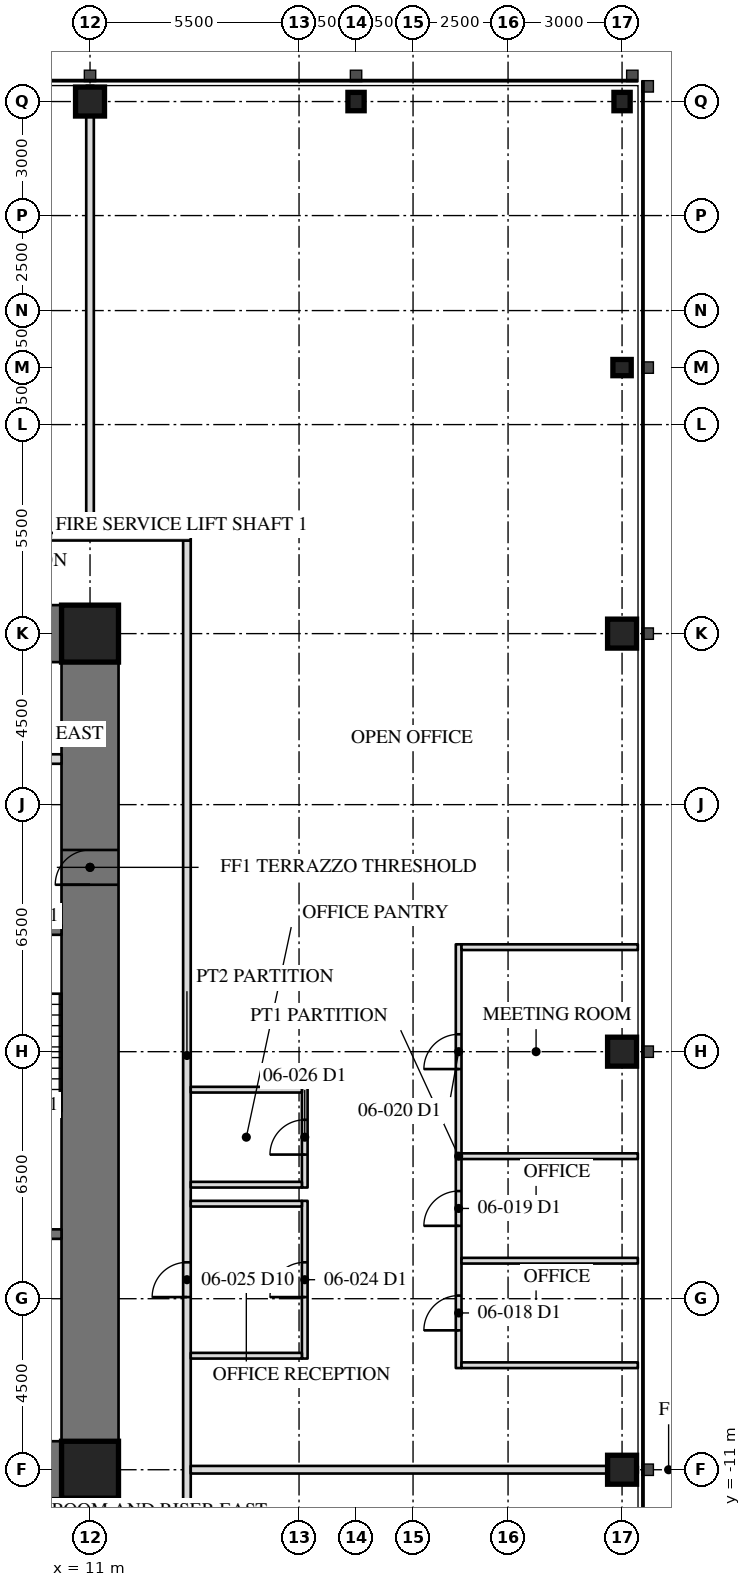
"""IFC4 building model, lengths in metres.
Left out: names, types, materials, properties, quantities, classifications, styles, units other than length and angle.
Written with IfcOpenShell. Run it as: python <this file> out.ifc"""

import sys

from ifc_helpers import new_model, si_unit, direction, frame, frame_2d, origin, origin_2d, place, context, subcontext, project, spatial, rectangle, hollow_rectangle, i_section, extrude, element, fill, save


model = new_model("IFC4")
c1 = context("Model", 3, precision=1e-05, world=origin(), true_north=direction((0.0, 1.0)))
c2 = subcontext(c1, "Body", "Model", "MODEL_VIEW")
j1 = project(units=[si_unit("LENGTHUNIT", "METRE"), si_unit("PLANEANGLEUNIT", "RADIAN")], contexts=[c1])
p1 = place(None, origin())
s1 = spatial("IfcSite", under=j1, at=p1, CompositionType="ELEMENT")
p2 = place(p1, origin())
s2 = spatial("IfcBuilding", under=s1, at=p2, CompositionType="ELEMENT")
p3 = place(p2, frame((0.0, 0.0, 28.3)))
s3 = spatial("IfcBuildingStorey", under=s2, at=p3, CompositionType="ELEMENT", Elevation=28.3)
for number, where, z_axis, x_axis in (
    (1, (25.0, -11.0, 0.0), (0.0, 0.0, 1.0), (0.0, 1.0, 0.0)),
    (2, (25.0, 0.0, 0.0), (0.0, 0.0, 1.0), (0.0, 1.0, 0.0)),
    (3, (25.0, 11.0, 0.0), (0.0, 0.0, 1.0), (0.0, 1.0, 0.0)),
):
    element("IfcColumn", number, at=place(p3, frame(where, z_axis=z_axis, x_axis=x_axis)), inside=s3, PredefinedType="COLUMN", context=c2, shape_type="SweptSolid", body=[
        extrude(hollow_rectangle(XDim=0.762, YDim=0.762, WallThickness=0.127, at=origin_2d()), origin(), (0.0, 0.0, 1.0), 4.1),
    ])
for number, where, z_axis, x_axis in (
    (4, (25.0, 18.0, 0.0), (0.0, 0.0, 1.0), (0.0, 1.0, 0.0)),
    (5, (25.0, 25.0, 0.0), (0.0, 0.0, 1.0), (1.0, 0.0, 0.0)),
    (6, (18.0, 25.0, 0.0), (0.0, 0.0, 1.0), (1.0, 0.0, 0.0)),
):
    element("IfcColumn", number, at=place(p3, frame(where, z_axis=z_axis, x_axis=x_axis)), inside=s3, PredefinedType="COLUMN", context=c2, shape_type="SweptSolid", body=[
        extrude(i_section(OverallWidth=0.427, OverallDepth=0.483, WebThickness=0.051, FlangeThickness=0.082, at=origin_2d()), origin(), (0.0, 0.0, 1.0), 4.1),
    ])
p4 = place(p3, frame((11.0, 25.0, 0.0), z_axis=(0.0, 0.0, 1.0), x_axis=(1.0, 0.0, 0.0)))
e7 = element("IfcColumn", 7, at=p4, inside=s3, PredefinedType="COLUMN", context=c2, shape_type="SweptSolid", body=[
    extrude(hollow_rectangle(XDim=0.762, YDim=0.762, WallThickness=0.127, at=origin_2d()), origin(), (0.0, 0.0, 1.0), 4.1),
])
p5 = place(p3, frame((11.0, -11.0, 0.0), z_axis=(0.0, 0.0, 1.0), x_axis=(0.0, 1.0, 0.0)))
e8 = element("IfcWall", 8, at=p5, inside=s3, PredefinedType="SHEAR", context=c2, shape_type="SweptSolid", body=[
    extrude(rectangle(XDim=22.0, YDim=1.5, at=frame_2d((11.0, 0.0))), origin(), (0.0, 0.0, 1.0), 4.1),
])
p6 = place(p5, frame((15.393, 0.0, 0.0)))
e9 = element("IfcOpeningElement", 9, at=p6, cuts=e8, PredefinedType="OPENING", context=c2, shape_type="SweptSolid", body=[
    extrude(rectangle(XDim=0.915, YDim=2.134, at=frame_2d((0.458, 1.067))), frame((0.0, 0.76, 0.0), z_axis=(0.0, -1.0, 0.0), x_axis=(1.0, 0.0, 0.0)), (0.0, 0.0, 1.0), 1.52),
])
for number, where, z_axis, x_axis in (
    (10, (11.0, 11.0, 0.0), (0.0, 0.0, 1.0), (-1.0, 0.0, 0.0)),
    (11, (6.5, -11.0, 0.0), (0.0, 0.0, 1.0), (1.0, 0.0, 0.0)),
):
    element("IfcWall", number, at=place(p3, frame(where, z_axis=z_axis, x_axis=x_axis)), inside=s3, PredefinedType="SHEAR", context=c2, shape_type="SweptSolid", body=[
        extrude(rectangle(XDim=4.5, YDim=1.5, at=frame_2d((2.25, 0.0))), origin(), (0.0, 0.0, 1.0), 4.1),
    ])
for number, where, z_axis, x_axis in (
    (12, (11.0, 11.0, 0.0), (0.0, 0.0, 1.0), (1.0, 0.0, 0.0)),
    (13, (11.0, -11.0, 0.0), (0.0, 0.0, 1.0), (1.0, 0.0, 0.0)),
):
    element("IfcColumn", number, at=place(p3, frame(where, z_axis=z_axis, x_axis=x_axis)), inside=s3, PredefinedType="COLUMN", context=c2, shape_type="SweptSolid", body=[
        extrude(hollow_rectangle(XDim=1.499, YDim=1.499, WallThickness=0.102, at=origin_2d()), origin(), (0.0, 0.0, 1.0), 4.1),
    ])
p7 = place(p3, frame((6.95, -4.8, 0.0), z_axis=(0.0, 0.0, 1.0), x_axis=(1.0, 0.0, 0.0)))
e14 = element("IfcWall", 14, at=p7, inside=s3, PredefinedType="SOLIDWALL", context=c2, shape_type="SweptSolid", body=[
    extrude(rectangle(XDim=3.3, YDim=0.25, at=frame_2d((1.65, 0.0))), origin(), (0.0, 0.0, 1.0), 3.91),
])
p8 = place(p3, frame((6.95, 3.2, 0.0), z_axis=(0.0, 0.0, 1.0), x_axis=(1.0, 0.0, 0.0)))
e15 = element("IfcWall", 15, at=p8, inside=s3, PredefinedType="SOLIDWALL", context=c2, shape_type="SweptSolid", body=[
    extrude(rectangle(XDim=3.3, YDim=0.25, at=frame_2d((1.65, 0.0))), origin(), (0.0, 0.0, 1.0), 3.91),
])
p9 = place(p8, frame((1.116, 0.0, 0.0)))
e16 = element("IfcOpeningElement", 16, at=p9, cuts=e15, PredefinedType="OPENING", context=c2, shape_type="SweptSolid", body=[
    extrude(rectangle(XDim=1.067, YDim=2.134, at=frame_2d((0.533, 1.067))), frame((0.0, 0.135, 0.0), z_axis=(0.0, -1.0, 0.0), x_axis=(1.0, 0.0, 0.0)), (0.0, 0.0, 1.0), 0.27),
])
p10 = place(p3, frame((6.95, 7.7, 0.0), z_axis=(0.0, 0.0, 1.0), x_axis=(1.0, 0.0, 0.0)))
e17 = element("IfcWall", 17, at=p10, inside=s3, PredefinedType="PARTITIONING", context=c2, shape_type="SweptSolid", body=[
    extrude(rectangle(XDim=3.3, YDim=0.25, at=frame_2d((1.65, 0.0))), origin(), (0.0, 0.0, 1.0), 3.91),
])
p11 = place(p10, frame((0.45, 0.0, 0.0)))
e18 = element("IfcOpeningElement", 18, at=p11, cuts=e17, PredefinedType="OPENING", context=c2, shape_type="SweptSolid", body=[
    extrude(rectangle(XDim=1.219, YDim=2.134, at=frame_2d((0.609, 1.067))), frame((0.0, 0.135, 0.0), z_axis=(0.0, -1.0, 0.0), x_axis=(1.0, 0.0, 0.0)), (0.0, 0.0, 1.0), 0.27),
])
p12 = place(p3, frame((13.55, -13.65, 0.0), z_axis=(0.0, 0.0, 1.0), x_axis=(0.0, 1.0, 0.0)))
e19 = element("IfcWall", 19, at=p12, inside=s3, PredefinedType="PARTITIONING", context=c2, shape_type="SweptSolid", body=[
    extrude(rectangle(XDim=27.1, YDim=0.2, at=frame_2d((13.55, 0.0))), origin(), (0.0, 0.0, 1.0), 3.91),
])
p13 = place(p12, frame((7.192, 0.0, 0.0)))
e20 = element("IfcOpeningElement", 20, at=p13, cuts=e19, PredefinedType="OPENING", context=c2, shape_type="SweptSolid", body=[
    extrude(rectangle(XDim=0.915, YDim=2.134, at=frame_2d((0.458, 1.067))), frame((0.0, 0.11, 0.0), z_axis=(0.0, -1.0, 0.0), x_axis=(1.0, 0.0, 0.0)), (0.0, 0.0, 1.0), 0.22),
])
p14 = place(p3, frame((13.65, 13.55, 0.0), z_axis=(0.0, 0.0, 1.0), x_axis=(-1.0, 0.0, 0.0)))
e21 = element("IfcWall", 21, at=p14, inside=s3, PredefinedType="PARTITIONING", context=c2, shape_type="SweptSolid", body=[
    extrude(rectangle(XDim=27.1, YDim=0.2, at=frame_2d((13.55, 0.0))), origin(), (0.0, 0.0, 1.0), 3.91),
])
p15 = place(p14, frame((9.192, 0.0, 0.0)))
e22 = element("IfcOpeningElement", 22, at=p15, cuts=e21, PredefinedType="OPENING", context=c2, shape_type="SweptSolid", body=[
    extrude(rectangle(XDim=0.915, YDim=2.134, at=frame_2d((0.458, 1.067))), frame((0.0, 0.11, 0.0), z_axis=(0.0, -1.0, 0.0), x_axis=(1.0, 0.0, 0.0)), (0.0, 0.0, 1.0), 0.22),
])
for number, where, z_axis, x_axis in (
    (23, (11.0, 13.65, 0.0), (0.0, 0.0, 1.0), (0.0, 1.0, 0.0)),
    (24, (13.65, -11.0, 0.0), (0.0, 0.0, 1.0), (1.0, 0.0, 0.0)),
):
    element("IfcWall", number, at=place(p3, frame(where, z_axis=z_axis, x_axis=x_axis)), inside=s3, PredefinedType="PARTITIONING", context=c2, shape_type="SweptSolid", body=[
        extrude(rectangle(XDim=11.765, YDim=0.2, at=frame_2d((5.883, 0.0))), origin(), (0.0, 0.0, 1.0), 3.13),
    ])
p16 = place(p3, frame((20.7, -8.325, 0.0), z_axis=(0.0, 0.0, 1.0), x_axis=(0.0, 1.0, 0.0)))
e25 = element("IfcWall", 25, at=p16, inside=s3, PredefinedType="PARTITIONING", context=c2, shape_type="SweptSolid", body=[
    extrude(rectangle(XDim=11.15, YDim=0.15, at=frame_2d((5.575, 0.0))), origin(), (0.0, 0.0, 1.0), 3.91),
])
p17 = place(p16, frame((0.992, 0.0, 0.0)))
e26 = element("IfcOpeningElement", 26, at=p17, cuts=e25, PredefinedType="OPENING", context=c2, shape_type="SweptSolid", body=[
    extrude(rectangle(XDim=0.915, YDim=2.134, at=frame_2d((0.458, 1.067))), frame((0.0, 0.085, 0.0), z_axis=(0.0, -1.0, 0.0), x_axis=(1.0, 0.0, 0.0)), (0.0, 0.0, 1.0), 0.17),
])
p18 = place(p16, frame((3.742, 0.0, 0.0)))
e27 = element("IfcOpeningElement", 27, at=p18, cuts=e25, PredefinedType="OPENING", context=c2, shape_type="SweptSolid", body=[
    extrude(rectangle(XDim=0.915, YDim=2.134, at=frame_2d((0.458, 1.067))), frame((0.0, 0.085, 0.0), z_axis=(0.0, -1.0, 0.0), x_axis=(1.0, 0.0, 0.0)), (0.0, 0.0, 1.0), 0.17),
])
p19 = place(p16, frame((7.867, 0.0, 0.0)))
e28 = element("IfcOpeningElement", 28, at=p19, cuts=e25, PredefinedType="OPENING", context=c2, shape_type="SweptSolid", body=[
    extrude(rectangle(XDim=0.915, YDim=2.134, at=frame_2d((0.458, 1.067))), frame((0.0, 0.085, 0.0), z_axis=(0.0, -1.0, 0.0), x_axis=(1.0, 0.0, 0.0)), (0.0, 0.0, 1.0), 0.17),
])
for number, where, z_axis, x_axis in (
    (29, (20.775, -8.25, 0.0), (0.0, 0.0, 1.0), (1.0, 0.0, 0.0)),
    (30, (20.775, -5.5, 0.0), (0.0, 0.0, 1.0), (1.0, 0.0, 0.0)),
    (31, (20.775, -2.75, 0.0), (0.0, 0.0, 1.0), (1.0, 0.0, 0.0)),
    (32, (20.775, 2.75, 0.0), (0.0, 0.0, 1.0), (1.0, 0.0, 0.0)),
):
    element("IfcWall", number, at=place(p3, frame(where, z_axis=z_axis, x_axis=x_axis)), inside=s3, PredefinedType="PARTITIONING", context=c2, shape_type="SweptSolid", body=[
        extrude(rectangle(XDim=4.64, YDim=0.15, at=frame_2d((2.32, 0.0))), origin(), (0.0, 0.0, 1.0), 3.91),
    ])
p20 = place(p3, frame((16.65, -8.075, 0.0), z_axis=(0.0, 0.0, 1.0), x_axis=(0.0, 1.0, 0.0)))
e33 = element("IfcWall", 33, at=p20, inside=s3, PredefinedType="PARTITIONING", context=c2, shape_type="SweptSolid", body=[
    extrude(rectangle(XDim=4.15, YDim=0.15, at=frame_2d((2.075, 0.0))), origin(), (0.0, 0.0, 1.0), 3.91),
])
p21 = place(p20, frame((1.617, 0.0, 0.0)))
e34 = element("IfcOpeningElement", 34, at=p21, cuts=e33, PredefinedType="OPENING", context=c2, shape_type="SweptSolid", body=[
    extrude(rectangle(XDim=0.915, YDim=2.134, at=frame_2d((0.458, 1.067))), frame((0.0, 0.085, 0.0), z_axis=(0.0, -1.0, 0.0), x_axis=(1.0, 0.0, 0.0)), (0.0, 0.0, 1.0), 0.17),
])
for number, where, z_axis, x_axis in (
    (35, (16.575, -8.0, 0.0), (0.0, 0.0, 1.0), (-1.0, 0.0, 0.0)),
    (36, (16.575, -4.0, 0.0), (0.0, 0.0, 1.0), (-1.0, 0.0, 0.0)),
):
    element("IfcWall", number, at=place(p3, frame(where, z_axis=z_axis, x_axis=x_axis)), inside=s3, PredefinedType="PARTITIONING", context=c2, shape_type="SweptSolid", body=[
        extrude(rectangle(XDim=2.925, YDim=0.15, at=frame_2d((1.462, 0.0))), origin(), (0.0, 0.0, 1.0), 3.91),
    ])
p22 = place(p3, frame((16.65, -3.575, 0.0), z_axis=(0.0, 0.0, 1.0), x_axis=(0.0, 1.0, 0.0)))
e37 = element("IfcWall", 37, at=p22, inside=s3, PredefinedType="PARTITIONING", context=c2, shape_type="SweptSolid", body=[
    extrude(rectangle(XDim=2.65, YDim=0.15, at=frame_2d((1.325, 0.0))), origin(), (0.0, 0.0, 1.0), 3.91),
])
p23 = place(p22, frame((0.867, 0.0, 0.0)))
e38 = element("IfcOpeningElement", 38, at=p23, cuts=e37, PredefinedType="OPENING", context=c2, shape_type="SweptSolid", body=[
    extrude(rectangle(XDim=0.915, YDim=2.134, at=frame_2d((0.458, 1.067))), frame((0.0, 0.085, 0.0), z_axis=(0.0, -1.0, 0.0), x_axis=(1.0, 0.0, 0.0)), (0.0, 0.0, 1.0), 0.17),
])
for number, where, z_axis, x_axis in (
    (39, (16.575, -3.5, 0.0), (0.0, 0.0, 1.0), (-1.0, 0.0, 0.0)),
    (40, (16.575, -1.0, 0.0), (0.0, 0.0, 1.0), (-1.0, 0.0, 0.0)),
):
    element("IfcWall", number, at=place(p3, frame(where, z_axis=z_axis, x_axis=x_axis)), inside=s3, PredefinedType="PARTITIONING", context=c2, shape_type="SweptSolid", body=[
        extrude(rectangle(XDim=2.925, YDim=0.15, at=frame_2d((1.462, 0.0))), origin(), (0.0, 0.0, 1.0), 3.91),
    ])
p24 = place(p6, origin())
e41 = element("IfcDoor", 41, at=p24, inside=s3, OperationType="SINGLE_SWING_RIGHT", PredefinedType="DOOR", context=c2, shape_type="SweptSolid", body=[
    extrude(rectangle(XDim=0.915, YDim=2.134, at=frame_2d((0.458, 1.067))), frame((0.0, -0.675, 0.0), z_axis=(0.0, -1.0, 0.0), x_axis=(1.0, 0.0, 0.0)), (0.0, 0.0, 1.0), 0.05),
])
fill(e9, e41)
p25 = place(p17, origin())
e42 = element("IfcDoor", 42, at=p25, inside=s3, OperationType="SINGLE_SWING_LEFT", PredefinedType="DOOR", context=c2, shape_type="SweptSolid", body=[
    extrude(rectangle(XDim=0.915, YDim=2.134, at=frame_2d((0.458, 1.067))), frame((0.0, 0.025, 0.0), z_axis=(0.0, -1.0, 0.0), x_axis=(1.0, 0.0, 0.0)), (0.0, 0.0, 1.0), 0.05),
])
fill(e26, e42)
p26 = place(p18, origin())
e43 = element("IfcDoor", 43, at=p26, inside=s3, OperationType="SINGLE_SWING_LEFT", PredefinedType="DOOR", context=c2, shape_type="SweptSolid", body=[
    extrude(rectangle(XDim=0.915, YDim=2.134, at=frame_2d((0.458, 1.067))), frame((0.0, 0.025, 0.0), z_axis=(0.0, -1.0, 0.0), x_axis=(1.0, 0.0, 0.0)), (0.0, 0.0, 1.0), 0.05),
])
fill(e27, e43)
p27 = place(p19, origin())
e44 = element("IfcDoor", 44, at=p27, inside=s3, OperationType="SINGLE_SWING_LEFT", PredefinedType="DOOR", context=c2, shape_type="SweptSolid", body=[
    extrude(rectangle(XDim=0.915, YDim=2.134, at=frame_2d((0.458, 1.067))), frame((0.0, 0.025, 0.0), z_axis=(0.0, -1.0, 0.0), x_axis=(1.0, 0.0, 0.0)), (0.0, 0.0, 1.0), 0.05),
])
fill(e28, e44)
p28 = place(p21, origin())
e45 = element("IfcDoor", 45, at=p28, inside=s3, OperationType="SINGLE_SWING_LEFT", PredefinedType="DOOR", context=c2, shape_type="SweptSolid", body=[
    extrude(rectangle(XDim=0.915, YDim=2.134, at=frame_2d((0.458, 1.067))), frame((0.0, 0.025, 0.0), z_axis=(0.0, -1.0, 0.0), x_axis=(1.0, 0.0, 0.0)), (0.0, 0.0, 1.0), 0.05),
])
fill(e34, e45)
p29 = place(p13, origin())
e46 = element("IfcDoor", 46, at=p29, inside=s3, OperationType="SINGLE_SWING_LEFT", PredefinedType="DOOR", context=c2, shape_type="SweptSolid", body=[
    extrude(rectangle(XDim=0.915, YDim=2.134, at=frame_2d((0.458, 1.067))), frame((0.0, 0.025, 0.0), z_axis=(0.0, -1.0, 0.0), x_axis=(1.0, 0.0, 0.0)), (0.0, 0.0, 1.0), 0.05),
])
fill(e20, e46)
p30 = place(p23, origin())
e47 = element("IfcDoor", 47, at=p30, inside=s3, OperationType="SINGLE_SWING_LEFT", PredefinedType="DOOR", context=c2, shape_type="SweptSolid", body=[
    extrude(rectangle(XDim=0.915, YDim=2.134, at=frame_2d((0.458, 1.067))), frame((0.0, 0.025, 0.0), z_axis=(0.0, -1.0, 0.0), x_axis=(1.0, 0.0, 0.0)), (0.0, 0.0, 1.0), 0.05),
])
fill(e38, e47)
save(model, sys.argv[1])
